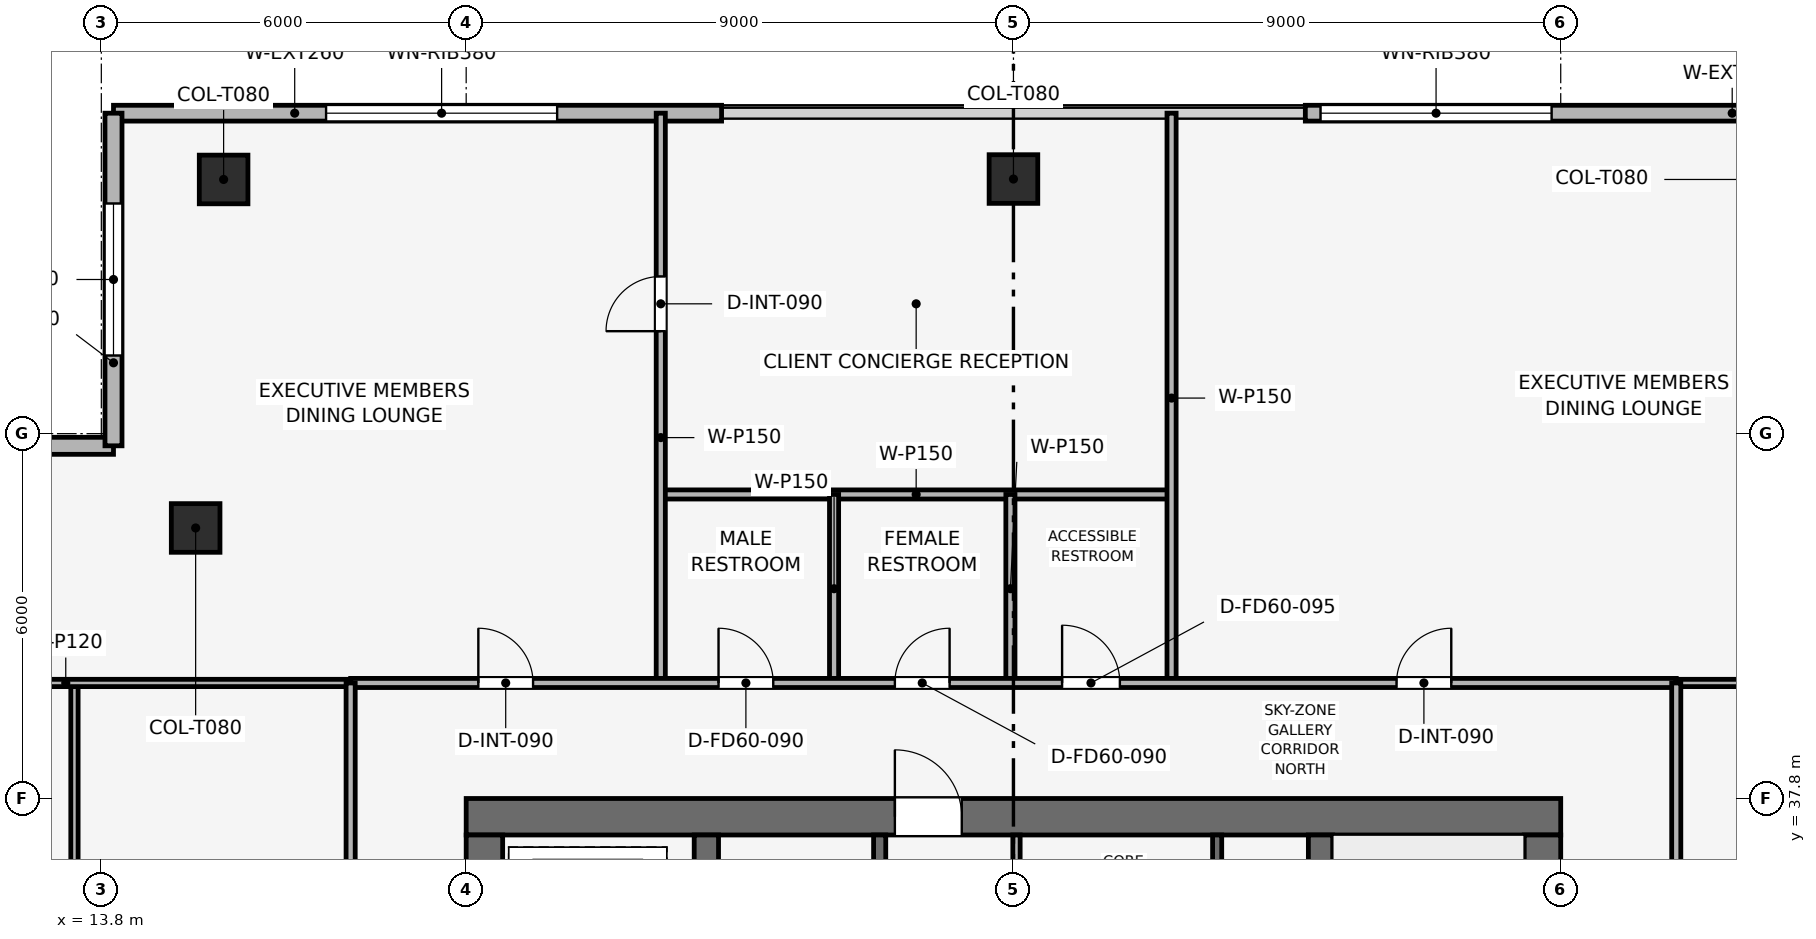
"""IFC4 building model, lengths in metres.
Left out: names, types, materials, properties, quantities, classifications, styles, units other than length and angle.
Written with IfcOpenShell. Run it as: python <this file> out.ifc"""

import sys

from ifc_helpers import new_model, si_unit, direction, frame, frame_2d, origin, origin_2d, place, context, subcontext, project, spatial, rectangle, extrude, element, fill, save


model = new_model("IFC4")
c1 = context("Model", 3, precision=1e-05, world=origin(), true_north=direction((0.0, 1.0)))
c2 = subcontext(c1, "Body", "Model", "MODEL_VIEW")
j1 = project(units=[si_unit("LENGTHUNIT", "METRE"), si_unit("PLANEANGLEUNIT", "RADIAN")], contexts=[c1])
p1 = place(None, origin())
s1 = spatial("IfcSite", under=j1, at=p1, CompositionType="ELEMENT")
p2 = place(p1, origin())
s2 = spatial("IfcBuilding", under=s1, at=p2, CompositionType="ELEMENT")
p3 = place(p2, frame((0.0, 0.0, 364.5)))
s3 = spatial("IfcBuildingStorey", under=s2, at=p3, CompositionType="ELEMENT", Elevation=364.5)
p4 = place(p3, frame((19.8, 37.5, 0.0), z_axis=(0.0, 0.0, 1.0), x_axis=(1.0, 0.0, 0.0)))
e1 = element("IfcWall", 1, at=p4, inside=s3, PredefinedType="SHEAR", context=c2, shape_type="SweptSolid", body=[
    extrude(rectangle(XDim=18.0, YDim=0.6, at=frame_2d((9.0, 0.0))), origin(), (0.0, 0.0, 1.0), 4.5),
])
p5 = place(p4, frame((7.05, 0.0, 0.0)))
e2 = element("IfcOpeningElement", 2, at=p5, cuts=e1, PredefinedType="OPENING", context=c2, shape_type="SweptSolid", body=[
    extrude(rectangle(XDim=1.1, YDim=2.15, at=frame_2d((0.55, 1.075))), frame((0.0, 0.31, 0.0), z_axis=(0.0, -1.0, 0.0), x_axis=(1.0, 0.0, 0.0)), (0.0, 0.0, 1.0), 0.62),
])
p6 = place(p3, frame((20.1, 20.4, 0.0), z_axis=(0.0, 0.0, 1.0), x_axis=(0.0, 1.0, 0.0)))
e3 = element("IfcWall", 3, at=p6, inside=s3, PredefinedType="SHEAR", context=c2, shape_type="SweptSolid", body=[
    extrude(rectangle(XDim=16.8, YDim=0.6, at=frame_2d((8.4, 0.0))), origin(), (0.0, 0.0, 1.0), 4.5),
])
p7 = place(p6, frame((10.4, 0.0, 0.0)))
e4 = element("IfcOpeningElement", 4, at=p7, cuts=e3, PredefinedType="OPENING", context=c2, shape_type="SweptSolid", body=[
    extrude(rectangle(XDim=1.1, YDim=2.15, at=frame_2d((0.55, 1.075))), frame((0.0, 0.31, 0.0), z_axis=(0.0, -1.0, 0.0), x_axis=(1.0, 0.0, 0.0)), (0.0, 0.0, 1.0), 0.62),
])
p8 = place(p3, frame((37.5, 20.4, 0.0), z_axis=(0.0, 0.0, 1.0), x_axis=(0.0, 1.0, 0.0)))
e5 = element("IfcWall", 5, at=p8, inside=s3, PredefinedType="SHEAR", context=c2, shape_type="SweptSolid", body=[
    extrude(rectangle(XDim=16.8, YDim=0.6, at=frame_2d((8.4, 0.0))), origin(), (0.0, 0.0, 1.0), 4.5),
])
p9 = place(p8, frame((4.9, 0.0, 0.0)))
e6 = element("IfcOpeningElement", 6, at=p9, cuts=e5, PredefinedType="OPENING", context=c2, shape_type="SweptSolid", body=[
    extrude(rectangle(XDim=1.1, YDim=2.15, at=frame_2d((0.55, 1.075))), frame((0.0, 0.31, 0.0), z_axis=(0.0, -1.0, 0.0), x_axis=(1.0, 0.0, 0.0)), (0.0, 0.0, 1.0), 0.62),
])
for number, where, z_axis, x_axis in (
    (7, (23.75, 20.4, 0.0), (0.0, 0.0, 1.0), (0.0, 1.0, 0.0)),
    (8, (33.85, 20.4, 0.0), (0.0, 0.0, 1.0), (0.0, 1.0, 0.0)),
):
    element("IfcWall", number, at=place(p3, frame(where, z_axis=z_axis, x_axis=x_axis)), inside=s3, PredefinedType="SHEAR", context=c2, shape_type="SweptSolid", body=[
        extrude(rectangle(XDim=16.8, YDim=0.4, at=frame_2d((8.4, 0.0))), origin(), (0.0, 0.0, 1.0), 4.5),
    ])
p10 = place(p3, frame((41.789, 47.98, 0.051), z_axis=(-0.202047238794, -0.363749581663, 0.909320160964), x_axis=(0.874193862425, -0.485577069989, 0.0)))
e9 = element("IfcColumn", 9, at=p10, inside=s3, PredefinedType="COLUMN", context=c2, shape_type="SweptSolid", body=[
    extrude(rectangle(XDim=0.8, YDim=0.8, at=origin_2d()), origin(), (0.0, 0.0, 1.0), 4.539),
])
p11 = place(p3, frame((28.8, 47.987, 0.033), z_axis=(0.0, -0.371428235787, 0.928461666231), x_axis=(1.0, 0.0, 0.0)))
e10 = element("IfcColumn", 10, at=p11, inside=s3, PredefinedType="COLUMN", context=c2, shape_type="SweptSolid", body=[
    extrude(rectangle(XDim=0.8, YDim=0.8, at=origin_2d()), origin(), (0.0, 0.0, 1.0), 4.483),
])
p12 = place(p3, frame((15.811, 47.98, 0.051), z_axis=(0.202047238794, -0.363749581663, 0.909320160964), x_axis=(0.874193862425, 0.485577069989, 0.0)))
e11 = element("IfcColumn", 11, at=p12, inside=s3, PredefinedType="COLUMN", context=c2, shape_type="SweptSolid", body=[
    extrude(rectangle(XDim=0.8, YDim=0.8, at=origin_2d()), origin(), (0.0, 0.0, 1.0), 4.539),
])
p13 = place(p3, frame((15.351, 42.249, 0.005), z_axis=(0.212058875874, -0.212114432299, 0.953959381092), x_axis=(0.707199388975, 0.707014161267, 0.0)))
e12 = element("IfcColumn", 12, at=p13, inside=s3, PredefinedType="COLUMN", context=c2, shape_type="SweptSolid", body=[
    extrude(rectangle(XDim=0.8, YDim=0.8, at=origin_2d()), origin(), (0.0, 0.0, 1.0), 4.395),
])
p14 = place(p3, frame((14.0, 49.07, 0.0), z_axis=(0.0, 0.0, 1.0), x_axis=(1.0, 0.0, 0.0)))
e13 = element("IfcWall", 13, at=p14, inside=s3, PredefinedType="SOLIDWALL", context=c2, shape_type="SweptSolid", body=[
    extrude(rectangle(XDim=10.0, YDim=0.26, at=frame_2d((5.0, 0.0))), origin(), (0.0, 0.0, 1.0), 4.2),
])
p15 = place(p14, frame((3.496, 0.0, 0.9)))
e14 = element("IfcOpeningElement", 14, at=p15, cuts=e13, PredefinedType="OPENING", context=c2, shape_type="SweptSolid", body=[
    extrude(rectangle(XDim=3.8, YDim=1.9, at=frame_2d((1.9, 0.95))), frame((0.0, 0.14, 0.0), z_axis=(0.0, -1.0, 0.0), x_axis=(1.0, 0.0, 0.0)), (0.0, 0.0, 1.0), 0.28),
])
p16 = place(p3, frame((33.6, 49.07, 0.0), z_axis=(0.0, 0.0, 1.0), x_axis=(1.0, 0.0, 0.0)))
e15 = element("IfcWall", 15, at=p16, inside=s3, PredefinedType="SOLIDWALL", context=c2, shape_type="SweptSolid", body=[
    extrude(rectangle(XDim=10.0, YDim=0.26, at=frame_2d((5.0, 0.0))), origin(), (0.0, 0.0, 1.0), 4.2),
])
p17 = place(p16, frame((0.25, 0.0, 0.9)))
e16 = element("IfcOpeningElement", 16, at=p17, cuts=e15, PredefinedType="OPENING", context=c2, shape_type="SweptSolid", body=[
    extrude(rectangle(XDim=3.8, YDim=1.9, at=frame_2d((1.9, 0.95))), frame((0.0, 0.14, 0.0), z_axis=(0.0, -1.0, 0.0), x_axis=(1.0, 0.0, 0.0)), (0.0, 0.0, 1.0), 0.28),
])
p18 = place(p3, frame((8.53, 43.6, 0.0), z_axis=(0.0, 0.0, 1.0), x_axis=(1.0, 0.0, 0.0)))
e17 = element("IfcWall", 17, at=p18, inside=s3, PredefinedType="SOLIDWALL", context=c2, shape_type="SweptSolid", body=[
    extrude(rectangle(XDim=5.47, YDim=0.28, at=frame_2d((2.735, 0.0))), origin(), (0.0, 0.0, 1.0), 4.2),
])
p19 = place(p18, frame((1.485, 0.0, 0.9)))
e18 = element("IfcOpeningElement", 18, at=p19, cuts=e17, PredefinedType="OPENING", context=c2, shape_type="SweptSolid", body=[
    extrude(rectangle(XDim=2.5, YDim=1.9, at=frame_2d((1.25, 0.95))), frame((0.0, 0.15, 0.0), z_axis=(0.0, -1.0, 0.0), x_axis=(1.0, 0.0, 0.0)), (0.0, 0.0, 1.0), 0.3),
])
p20 = place(p3, frame((14.0, 43.6, 0.0), z_axis=(0.0, 0.0, 1.0), x_axis=(0.0, 1.0, 0.0)))
e19 = element("IfcWall", 19, at=p20, inside=s3, PredefinedType="SOLIDWALL", context=c2, shape_type="SweptSolid", body=[
    extrude(rectangle(XDim=5.47, YDim=0.28, at=frame_2d((2.735, 0.0))), origin(), (0.0, 0.0, 1.0), 4.2),
])
p21 = place(p20, frame((1.485, 0.0, 0.9)))
e20 = element("IfcOpeningElement", 20, at=p21, cuts=e19, PredefinedType="OPENING", context=c2, shape_type="SweptSolid", body=[
    extrude(rectangle(XDim=2.5, YDim=1.9, at=frame_2d((1.25, 0.95))), frame((0.0, 0.15, 0.0), z_axis=(0.0, -1.0, 0.0), x_axis=(1.0, 0.0, 0.0)), (0.0, 0.0, 1.0), 0.3),
])
p22 = place(p3, frame((32.15, 34.0, 0.0), z_axis=(0.0, 0.0, 1.0), x_axis=(0.0, 1.0, 0.0)))
e21 = element("IfcWall", 21, at=p22, inside=s3, PredefinedType="SHEAR", context=c2, shape_type="SweptSolid", body=[
    extrude(rectangle(XDim=3.2, YDim=0.15, at=frame_2d((1.6, 0.0))), origin(), (0.0, 0.0, 1.0), 4.2),
])
p23 = place(p3, frame((26.6, 34.0, 0.0), z_axis=(0.0, 0.0, 1.0), x_axis=(0.0, 1.0, 0.0)))
e22 = element("IfcWall", 22, at=p23, inside=s3, PredefinedType="SHEAR", context=c2, shape_type="SweptSolid", body=[
    extrude(rectangle(XDim=3.2, YDim=0.2, at=frame_2d((1.6, 0.0))), origin(), (0.0, 0.0, 1.0), 4.2),
])
p24 = place(p23, frame((0.75, 0.0, 0.0)))
e23 = element("IfcOpeningElement", 23, at=p24, cuts=e22, PredefinedType="OPENING", context=c2, shape_type="SweptSolid", body=[
    extrude(rectangle(XDim=1.1, YDim=2.15, at=frame_2d((0.55, 1.075))), frame((0.0, 0.11, 0.0), z_axis=(0.0, -1.0, 0.0), x_axis=(1.0, 0.0, 0.0)), (0.0, 0.0, 1.0), 0.22),
])
p25 = place(p3, frame((28.85, 33.925, 0.0), z_axis=(0.0, 0.0, 1.0), x_axis=(0.0, 1.0, 0.0)))
e24 = element("IfcWall", 24, at=p25, inside=s3, PredefinedType="PARTITIONING", context=c2, shape_type="SweptSolid", body=[
    extrude(rectangle(XDim=3.275, YDim=0.12, at=frame_2d((1.637, 0.0))), origin(), (0.0, 0.0, 1.0), 4.2),
])
p26 = place(p25, frame((0.25, 0.0, 0.0)))
e25 = element("IfcOpeningElement", 25, at=p26, cuts=e24, PredefinedType="OPENING", context=c2, shape_type="SweptSolid", body=[
    extrude(rectangle(XDim=0.85, YDim=2.1, at=frame_2d((0.425, 1.05))), frame((0.0, 0.07, 0.0), z_axis=(0.0, -1.0, 0.0), x_axis=(1.0, 0.0, 0.0)), (0.0, 0.0, 1.0), 0.14),
])
p27 = place(p25, frame((1.795, 0.0, 0.0)))
e26 = element("IfcOpeningElement", 26, at=p27, cuts=e24, PredefinedType="OPENING", context=c2, shape_type="SweptSolid", body=[
    extrude(rectangle(XDim=0.85, YDim=2.1, at=frame_2d((0.425, 1.05))), frame((0.0, 0.07, 0.0), z_axis=(0.0, -1.0, 0.0), x_axis=(1.0, 0.0, 0.0)), (0.0, 0.0, 1.0), 0.14),
])
p28 = place(p3, frame((23.0, 42.8, 0.0), z_axis=(0.0, 0.0, 1.0), x_axis=(1.0, 0.0, 0.0)))
e27 = element("IfcWall", 27, at=p28, inside=s3, PredefinedType="PARTITIONING", context=c2, shape_type="SweptSolid", body=[
    extrude(rectangle(XDim=8.4, YDim=0.15, at=frame_2d((4.2, 0.0))), origin(), (0.0, 0.0, 1.0), 3.285),
])
p29 = place(p3, frame((23.0, 39.7, 0.0), z_axis=(0.0, 0.0, 1.0), x_axis=(0.0, 1.0, 0.0)))
e28 = element("IfcWall", 28, at=p29, inside=s3, PredefinedType="PARTITIONING", context=c2, shape_type="SweptSolid", body=[
    extrude(rectangle(XDim=9.37, YDim=0.15, at=frame_2d((4.685, 0.0))), origin(), (0.0, 0.0, 1.0), 3.825),
])
p30 = place(p29, frame((5.785, 0.0, 0.0)))
e29 = element("IfcOpeningElement", 29, at=p30, cuts=e28, PredefinedType="OPENING", context=c2, shape_type="SweptSolid", body=[
    extrude(rectangle(XDim=0.9, YDim=2.1, at=frame_2d((0.45, 1.05))), frame((0.0, 0.085, 0.0), z_axis=(0.0, -1.0, 0.0), x_axis=(1.0, 0.0, 0.0)), (0.0, 0.0, 1.0), 0.17),
])
p31 = place(p3, frame((31.4, 39.7, 0.0), z_axis=(0.0, 0.0, 1.0), x_axis=(0.0, 1.0, 0.0)))
e30 = element("IfcWall", 30, at=p31, inside=s3, PredefinedType="PARTITIONING", context=c2, shape_type="SweptSolid", body=[
    extrude(rectangle(XDim=9.37, YDim=0.15, at=frame_2d((4.685, 0.0))), origin(), (0.0, 0.0, 1.0), 3.825),
])
p32 = place(p3, frame((25.85, 39.7, 0.0), z_axis=(0.0, 0.0, 1.0), x_axis=(0.0, 1.0, 0.0)))
e31 = element("IfcWall", 31, at=p32, inside=s3, PredefinedType="PARTITIONING", context=c2, shape_type="SweptSolid", body=[
    extrude(rectangle(XDim=3.1, YDim=0.15, at=frame_2d((1.55, 0.0))), origin(), (0.0, 0.0, 1.0), 3.825),
])
p33 = place(p3, frame((28.75, 39.7, 0.0), z_axis=(0.0, 0.0, 1.0), x_axis=(0.0, 1.0, 0.0)))
e32 = element("IfcWall", 32, at=p33, inside=s3, PredefinedType="PARTITIONING", context=c2, shape_type="SweptSolid", body=[
    extrude(rectangle(XDim=3.1, YDim=0.15, at=frame_2d((1.55, 0.0))), origin(), (0.0, 0.0, 1.0), 3.285),
])
p34 = place(p3, frame((13.358, 22.841, 0.0), z_axis=(0.0, 0.0, 1.0), x_axis=(0.0, 1.0, 0.0)))
e33 = element("IfcWall", 33, at=p34, inside=s3, PredefinedType="PARTITIONING", context=c2, shape_type="SweptSolid", body=[
    extrude(rectangle(XDim=16.859, YDim=0.12, at=frame_2d((8.429, 0.0))), origin(), (0.0, 0.0, 1.0), 3.285),
])
p35 = place(p34, frame((11.869, 0.0, 0.0)))
e34 = element("IfcOpeningElement", 34, at=p35, cuts=e33, PredefinedType="OPENING", context=c2, shape_type="SweptSolid", body=[
    extrude(rectangle(XDim=0.9, YDim=2.1, at=frame_2d((0.45, 1.05))), frame((0.0, 0.07, 0.0), z_axis=(0.0, -1.0, 0.0), x_axis=(1.0, 0.0, 0.0)), (0.0, 0.0, 1.0), 0.14),
])
p36 = place(p3, frame((8.53, 39.7, 0.0), z_axis=(0.0, 0.0, 1.0), x_axis=(1.0, 0.0, 0.0)))
e35 = element("IfcWall", 35, at=p36, inside=s3, PredefinedType="PARTITIONING", context=c2, shape_type="SweptSolid", body=[
    extrude(rectangle(XDim=9.37, YDim=0.12, at=frame_2d((4.685, 0.0))), origin(), (0.0, 0.0, 1.0), 3.785),
])
p37 = place(p3, frame((39.7, 39.7, 0.0), z_axis=(0.0, 0.0, 1.0), x_axis=(1.0, 0.0, 0.0)))
e36 = element("IfcWall", 36, at=p37, inside=s3, PredefinedType="PARTITIONING", context=c2, shape_type="SweptSolid", body=[
    extrude(rectangle(XDim=9.37, YDim=0.12, at=frame_2d((4.685, 0.0))), origin(), (0.0, 0.0, 1.0), 3.785),
])
p38 = place(p3, frame((17.9, 39.7, 0.0), z_axis=(0.0, 0.0, 1.0), x_axis=(1.0, 0.0, 0.0)))
e37 = element("IfcWall", 37, at=p38, inside=s3, PredefinedType="PARTITIONING", context=c2, shape_type="SweptSolid", body=[
    extrude(rectangle(XDim=21.8, YDim=0.15, at=frame_2d((10.9, 0.0))), origin(), (0.0, 0.0, 1.0), 3.285),
])
p39 = place(p38, frame((2.1, 0.0, 0.0)))
e38 = element("IfcOpeningElement", 38, at=p39, cuts=e37, PredefinedType="OPENING", context=c2, shape_type="SweptSolid", body=[
    extrude(rectangle(XDim=0.9, YDim=2.1, at=frame_2d((0.45, 1.05))), frame((0.0, 0.085, 0.0), z_axis=(0.0, -1.0, 0.0), x_axis=(1.0, 0.0, 0.0)), (0.0, 0.0, 1.0), 0.17),
])
p40 = place(p38, frame((6.05, 0.0, 0.0)))
e39 = element("IfcOpeningElement", 39, at=p40, cuts=e37, PredefinedType="OPENING", context=c2, shape_type="SweptSolid", body=[
    extrude(rectangle(XDim=0.9, YDim=2.1, at=frame_2d((0.45, 1.05))), frame((0.0, 0.085, 0.0), z_axis=(0.0, -1.0, 0.0), x_axis=(1.0, 0.0, 0.0)), (0.0, 0.0, 1.0), 0.17),
])
p41 = place(p38, frame((8.95, 0.0, 0.0)))
e40 = element("IfcOpeningElement", 40, at=p41, cuts=e37, PredefinedType="OPENING", context=c2, shape_type="SweptSolid", body=[
    extrude(rectangle(XDim=0.9, YDim=2.1, at=frame_2d((0.45, 1.05))), frame((0.0, 0.085, 0.0), z_axis=(0.0, -1.0, 0.0), x_axis=(1.0, 0.0, 0.0)), (0.0, 0.0, 1.0), 0.17),
])
p42 = place(p38, frame((11.7, 0.0, 0.0)))
e41 = element("IfcOpeningElement", 41, at=p42, cuts=e37, PredefinedType="OPENING", context=c2, shape_type="SweptSolid", body=[
    extrude(rectangle(XDim=0.95, YDim=2.1, at=frame_2d((0.475, 1.05))), frame((0.0, 0.085, 0.0), z_axis=(0.0, -1.0, 0.0), x_axis=(1.0, 0.0, 0.0)), (0.0, 0.0, 1.0), 0.17),
])
p43 = place(p38, frame((17.2, 0.0, 0.0)))
e42 = element("IfcOpeningElement", 42, at=p43, cuts=e37, PredefinedType="OPENING", context=c2, shape_type="SweptSolid", body=[
    extrude(rectangle(XDim=0.9, YDim=2.1, at=frame_2d((0.45, 1.05))), frame((0.0, 0.085, 0.0), z_axis=(0.0, -1.0, 0.0), x_axis=(1.0, 0.0, 0.0)), (0.0, 0.0, 1.0), 0.17),
])
p44 = place(p3, frame((17.9, 14.0, 0.0), z_axis=(0.0, 0.0, 1.0), x_axis=(0.0, 1.0, 0.0)))
e43 = element("IfcWall", 43, at=p44, inside=s3, PredefinedType="PARTITIONING", context=c2, shape_type="SweptSolid", body=[
    extrude(rectangle(XDim=25.7, YDim=0.15, at=frame_2d((12.85, 0.0))), origin(), (0.0, 0.0, 1.0), 3.285),
])
p45 = place(p44, frame((3.971, 0.0, 0.0)))
e44 = element("IfcOpeningElement", 44, at=p45, cuts=e43, PredefinedType="OPENING", context=c2, shape_type="SweptSolid", body=[
    extrude(rectangle(XDim=0.9, YDim=2.1, at=frame_2d((0.45, 1.05))), frame((0.0, 0.085, 0.0), z_axis=(0.0, -1.0, 0.0), x_axis=(1.0, 0.0, 0.0)), (0.0, 0.0, 1.0), 0.17),
])
p46 = place(p44, frame((16.821, 0.0, 0.0)))
e45 = element("IfcOpeningElement", 45, at=p46, cuts=e43, PredefinedType="OPENING", context=c2, shape_type="SweptSolid", body=[
    extrude(rectangle(XDim=0.9, YDim=2.1, at=frame_2d((0.45, 1.05))), frame((0.0, 0.085, 0.0), z_axis=(0.0, -1.0, 0.0), x_axis=(1.0, 0.0, 0.0)), (0.0, 0.0, 1.0), 0.17),
])
p47 = place(p3, frame((39.7, 24.4, 0.0), z_axis=(0.0, 0.0, 1.0), x_axis=(0.0, 1.0, 0.0)))
e46 = element("IfcWall", 46, at=p47, inside=s3, PredefinedType="PARTITIONING", context=c2, shape_type="SweptSolid", body=[
    extrude(rectangle(XDim=15.3, YDim=0.15, at=frame_2d((7.65, 0.0))), origin(), (0.0, 0.0, 1.0), 3.285),
])
p48 = place(p47, frame((7.2, 0.0, 0.0)))
e47 = element("IfcOpeningElement", 47, at=p48, cuts=e46, PredefinedType="OPENING", context=c2, shape_type="SweptSolid", body=[
    extrude(rectangle(XDim=0.9, YDim=2.1, at=frame_2d((0.45, 1.05))), frame((0.0, 0.085, 0.0), z_axis=(0.0, -1.0, 0.0), x_axis=(1.0, 0.0, 0.0)), (0.0, 0.0, 1.0), 0.17),
])
p49 = place(p15, origin())
e48 = element("IfcWindow", 48, at=p49, inside=s3, PartitioningType="SINGLE_PANEL", PredefinedType="WINDOW", context=c2, shape_type="SweptSolid", body=[
    extrude(rectangle(XDim=3.8, YDim=1.9, at=frame_2d((1.9, 0.95))), frame((0.0, 0.03, 0.0), z_axis=(0.0, -1.0, 0.0), x_axis=(1.0, 0.0, 0.0)), (0.0, 0.0, 1.0), 0.06),
])
fill(e14, e48)
p50 = place(p17, origin())
e49 = element("IfcWindow", 49, at=p50, inside=s3, PartitioningType="SINGLE_PANEL", PredefinedType="WINDOW", context=c2, shape_type="SweptSolid", body=[
    extrude(rectangle(XDim=3.8, YDim=1.9, at=frame_2d((1.9, 0.95))), frame((0.0, 0.03, 0.0), z_axis=(0.0, -1.0, 0.0), x_axis=(1.0, 0.0, 0.0)), (0.0, 0.0, 1.0), 0.06),
])
fill(e16, e49)
p51 = place(p21, origin())
e50 = element("IfcWindow", 50, at=p51, inside=s3, PartitioningType="SINGLE_PANEL", PredefinedType="WINDOW", context=c2, shape_type="SweptSolid", body=[
    extrude(rectangle(XDim=2.5, YDim=1.9, at=frame_2d((1.25, 0.95))), frame((0.0, 0.03, 0.0), z_axis=(0.0, -1.0, 0.0), x_axis=(1.0, 0.0, 0.0)), (0.0, 0.0, 1.0), 0.06),
])
fill(e20, e50)
p52 = place(p30, origin())
e51 = element("IfcDoor", 51, at=p52, inside=s3, OperationType="SINGLE_SWING_LEFT", PredefinedType="DOOR", context=c2, shape_type="SweptSolid", body=[
    extrude(rectangle(XDim=0.9, YDim=2.1, at=frame_2d((0.45, 1.05))), frame((0.0, 0.025, 0.0), z_axis=(0.0, -1.0, 0.0), x_axis=(1.0, 0.0, 0.0)), (0.0, 0.0, 1.0), 0.05),
])
fill(e29, e51)
p53 = place(p39, origin())
e52 = element("IfcDoor", 52, at=p53, inside=s3, OperationType="SINGLE_SWING_LEFT", PredefinedType="DOOR", context=c2, shape_type="SweptSolid", body=[
    extrude(rectangle(XDim=0.9, YDim=2.1, at=frame_2d((0.45, 1.05))), frame((0.0, 0.025, 0.0), z_axis=(0.0, -1.0, 0.0), x_axis=(1.0, 0.0, 0.0)), (0.0, 0.0, 1.0), 0.05),
])
fill(e38, e52)
p54 = place(p40, origin())
e53 = element("IfcDoor", 53, at=p54, inside=s3, OperationType="SINGLE_SWING_LEFT", PredefinedType="DOOR", context=c2, shape_type="SweptSolid", body=[
    extrude(rectangle(XDim=0.9, YDim=2.1, at=frame_2d((0.45, 1.05))), frame((0.0, 0.025, 0.0), z_axis=(0.0, -1.0, 0.0), x_axis=(1.0, 0.0, 0.0)), (0.0, 0.0, 1.0), 0.05),
])
fill(e39, e53)
p55 = place(p41, origin())
e54 = element("IfcDoor", 54, at=p55, inside=s3, OperationType="SINGLE_SWING_RIGHT", PredefinedType="DOOR", context=c2, shape_type="SweptSolid", body=[
    extrude(rectangle(XDim=0.9, YDim=2.1, at=frame_2d((0.45, 1.05))), frame((0.0, 0.025, 0.0), z_axis=(0.0, -1.0, 0.0), x_axis=(1.0, 0.0, 0.0)), (0.0, 0.0, 1.0), 0.05),
])
fill(e40, e54)
p56 = place(p42, origin())
e55 = element("IfcDoor", 55, at=p56, inside=s3, OperationType="SINGLE_SWING_LEFT", PredefinedType="DOOR", context=c2, shape_type="SweptSolid", body=[
    extrude(rectangle(XDim=0.95, YDim=2.1, at=frame_2d((0.475, 1.05))), frame((0.0, 0.025, 0.0), z_axis=(0.0, -1.0, 0.0), x_axis=(1.0, 0.0, 0.0)), (0.0, 0.0, 1.0), 0.05),
])
fill(e41, e55)
p57 = place(p43, origin())
e56 = element("IfcDoor", 56, at=p57, inside=s3, OperationType="SINGLE_SWING_RIGHT", PredefinedType="DOOR", context=c2, shape_type="SweptSolid", body=[
    extrude(rectangle(XDim=0.9, YDim=2.1, at=frame_2d((0.45, 1.05))), frame((0.0, 0.025, 0.0), z_axis=(0.0, -1.0, 0.0), x_axis=(1.0, 0.0, 0.0)), (0.0, 0.0, 1.0), 0.05),
])
fill(e42, e56)
p58 = place(p5, origin())
e57 = element("IfcDoor", 57, at=p58, inside=s3, OperationType="SINGLE_SWING_LEFT", PredefinedType="DOOR", context=c2, shape_type="SweptSolid", body=[
    extrude(rectangle(XDim=1.1, YDim=2.15, at=frame_2d((0.55, 1.075))), frame((0.0, 0.025, 0.0), z_axis=(0.0, -1.0, 0.0), x_axis=(1.0, 0.0, 0.0)), (0.0, 0.0, 1.0), 0.05),
])
fill(e2, e57)
save(model, sys.argv[1])
